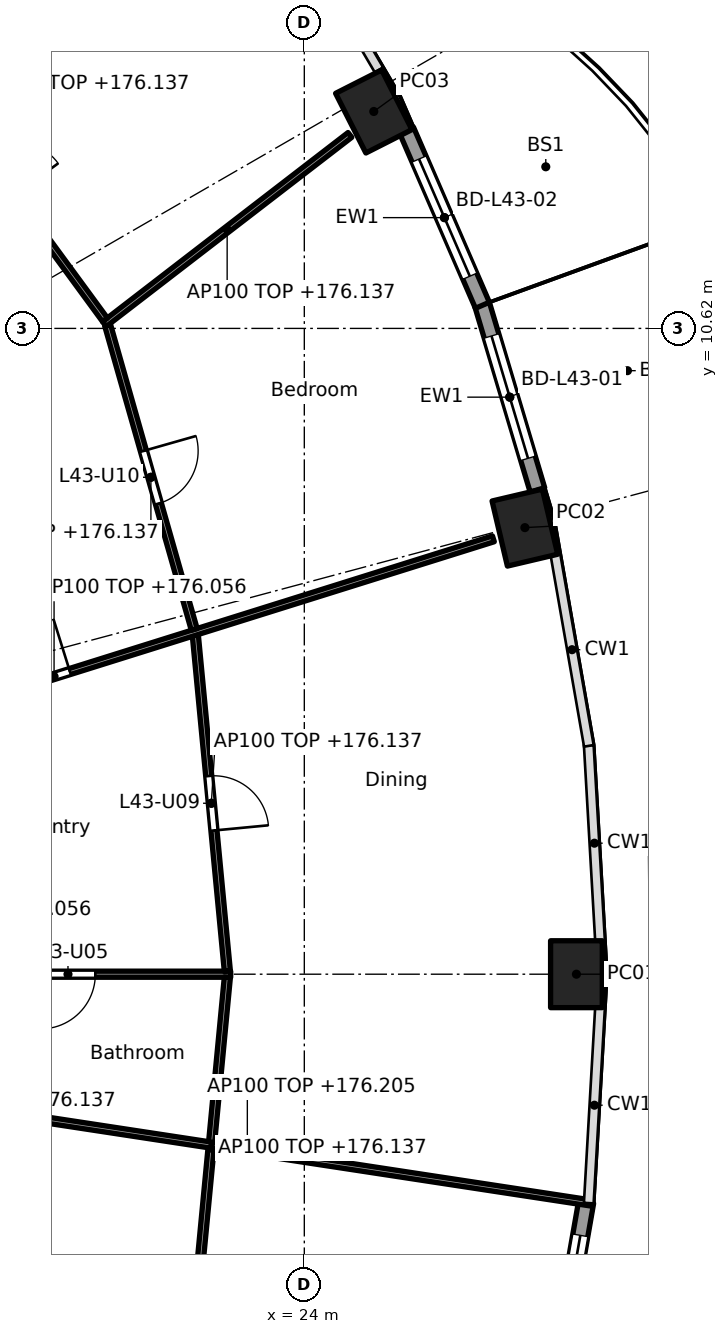
"""IFC4 building model, lengths in metres.
Left out: names, types, materials, properties, quantities, classifications, styles, units other than length and angle.
Written with IfcOpenShell. Run it as: python <this file> out.ifc"""

import sys

from ifc_helpers import new_model, si_unit, direction, frame, frame_2d, origin, origin_2d, place, context, subcontext, project, spatial, rectangle, hollow_rectangle, extrude, element, fill, save


model = new_model("IFC4")
c1 = context("Model", 3, precision=1e-05, world=origin(), true_north=direction((0.0, 1.0)))
c2 = subcontext(c1, "Body", "Model", "MODEL_VIEW")
j1 = project(units=[si_unit("LENGTHUNIT", "METRE"), si_unit("PLANEANGLEUNIT", "RADIAN")], contexts=[c1])
p1 = place(None, origin())
s1 = spatial("IfcSite", under=j1, at=p1, CompositionType="ELEMENT")
p2 = place(p1, origin())
s2 = spatial("IfcBuilding", under=s1, at=p2, CompositionType="ELEMENT")
p3 = place(p2, frame((0.0, 0.0, 173.3)))
s3 = spatial("IfcBuildingStorey", under=s2, at=p3, CompositionType="ELEMENT", Elevation=173.3)
for number, where, z_axis, x_axis in (
    (1, (28.475, 0.0, 0.0), (0.0, 0.0, 1.0), (0.0, 1.0, 0.0)),
    (2, (27.627, 7.344, 0.0), (0.0, 0.0, 1.0), (-0.229, 0.973, 0.0)),
    (3, (25.142, 14.188, 0.0), (0.0, 0.0, 1.0), (-0.452, 0.892, 0.0)),
):
    element("IfcColumn", number, at=place(p3, frame(where, z_axis=z_axis, x_axis=x_axis)), inside=s3, PredefinedType="COLUMN", context=c2, shape_type="SweptSolid", body=[
        extrude(hollow_rectangle(XDim=1.1, YDim=0.85, WallThickness=0.036, at=origin_2d()), origin(), (0.0, 0.0, 1.0), 3.7),
    ])
p4 = place(p3, frame((26.924, 11.014, 0.0), z_axis=(0.0, 0.0, 1.0), x_axis=(0.28584838049, -0.958274857946, 0.0)))
e4 = element("IfcWall", 4, at=p4, inside=s3, PredefinedType="SOLIDWALL", context=c2, shape_type="SweptSolid", body=[
    extrude(rectangle(XDim=3.182, YDim=0.25, at=frame_2d((1.591, 0.0))), origin(), (0.0, 0.0, 1.0), 3.44),
])
p5 = place(p4, frame((0.541, 0.0, 0.0)))
e5 = element("IfcOpeningElement", 5, at=p5, cuts=e4, PredefinedType="OPENING", context=c2, shape_type="SweptSolid", body=[
    extrude(rectangle(XDim=2.1, YDim=2.4, at=frame_2d((1.05, 1.2))), frame((0.0, 0.135, 0.0), z_axis=(0.0, -1.0, 0.0), x_axis=(1.0, 0.0, 0.0)), (0.0, 0.0, 1.0), 0.27),
])
p6 = place(p3, frame((25.679, 13.883, 0.0), z_axis=(0.0, 0.0, 1.0), x_axis=(0.397620521824, -0.917549955384, 0.0)))
e6 = element("IfcWall", 6, at=p6, inside=s3, PredefinedType="SOLIDWALL", context=c2, shape_type="SweptSolid", body=[
    extrude(rectangle(XDim=3.142, YDim=0.25, at=frame_2d((1.571, 0.0))), origin(), (0.0, 0.0, 1.0), 3.44),
])
p7 = place(p6, frame((0.521, 0.0, 0.0)))
e7 = element("IfcOpeningElement", 7, at=p7, cuts=e6, PredefinedType="OPENING", context=c2, shape_type="SweptSolid", body=[
    extrude(rectangle(XDim=2.1, YDim=2.4, at=frame_2d((1.05, 1.2))), frame((0.0, 0.135, 0.0), z_axis=(0.0, -1.0, 0.0), x_axis=(1.0, 0.0, 0.0)), (0.0, 0.0, 1.0), 0.27),
])
p8 = place(p3, frame((28.635, -3.747, 0.0), z_axis=(0.0, 0.0, 1.0), x_axis=(-0.172149769468, -0.985070787747, 0.0)))
e8 = element("IfcWall", 8, at=p8, inside=s3, PredefinedType="SOLIDWALL", context=c2, shape_type="SweptSolid", body=[
    extrude(rectangle(XDim=3.211, YDim=0.25, at=frame_2d((1.605, 0.0))), origin(), (0.0, 0.0, 1.0), 3.44),
])
p9 = place(p8, frame((0.555, 0.0, 0.0)))
e9 = element("IfcOpeningElement", 9, at=p9, cuts=e8, PredefinedType="OPENING", context=c2, shape_type="SweptSolid", body=[
    extrude(rectangle(XDim=2.1, YDim=2.4, at=frame_2d((1.05, 1.2))), frame((0.0, 0.135, 0.0), z_axis=(0.0, -1.0, 0.0), x_axis=(1.0, 0.0, 0.0)), (0.0, 0.0, 1.0), 0.27),
])
p10 = place(p3, frame((12.665, 0.0, 0.0), z_axis=(0.0, 0.0, 1.0), x_axis=(1.0, 0.0, 0.0)))
e10 = element("IfcWall", 10, at=p10, inside=s3, PredefinedType="PARTITIONING", context=c2, shape_type="SweptSolid", body=[
    extrude(rectangle(XDim=10.124, YDim=0.1, at=frame_2d((5.062, 0.0))), origin(), (0.0, 0.0, 1.0), 2.756),
])
p11 = place(p10, frame((1.961, 0.0, 0.0)))
e11 = element("IfcOpeningElement", 11, at=p11, cuts=e10, PredefinedType="OPENING", context=c2, shape_type="SweptSolid", body=[
    extrude(rectangle(XDim=0.9, YDim=2.1, at=frame_2d((0.45, 1.05))), frame((0.0, 0.06, 0.0), z_axis=(0.0, -1.0, 0.0), x_axis=(1.0, 0.0, 0.0)), (0.0, 0.0, 1.0), 0.12),
])
p12 = place(p10, frame((6.999, 0.0, 0.0)))
e12 = element("IfcOpeningElement", 12, at=p12, cuts=e10, PredefinedType="OPENING", context=c2, shape_type="SweptSolid", body=[
    extrude(rectangle(XDim=0.9, YDim=2.1, at=frame_2d((0.45, 1.05))), frame((0.0, 0.06, 0.0), z_axis=(0.0, -1.0, 0.0), x_axis=(1.0, 0.0, 0.0)), (0.0, 0.0, 1.0), 0.12),
])
p13 = place(p3, frame((22.734, 0.05, 0.0), z_axis=(0.0, 0.0, 1.0), x_axis=(-0.094923312677, 0.995484587882, 0.0)))
e13 = element("IfcWall", 13, at=p13, inside=s3, PredefinedType="PARTITIONING", context=c2, shape_type="SweptSolid", body=[
    extrude(rectangle(XDim=5.548, YDim=0.1, at=frame_2d((2.774, 0.0))), origin(), (0.0, 0.0, 1.0), 2.837),
])
p14 = place(p13, frame((2.324, 0.0, 0.0)))
e14 = element("IfcOpeningElement", 14, at=p14, cuts=e13, PredefinedType="OPENING", context=c2, shape_type="SweptSolid", body=[
    extrude(rectangle(XDim=0.9, YDim=2.1, at=frame_2d((0.45, 1.05))), frame((0.0, 0.06, 0.0), z_axis=(0.0, -1.0, 0.0), x_axis=(1.0, 0.0, 0.0)), (0.0, 0.0, 1.0), 0.12),
])
p15 = place(p3, frame((22.734, -0.05, 0.0), z_axis=(0.0, 0.0, 1.0), x_axis=(-0.0949274088, -0.995484197292, 0.0)))
e15 = element("IfcWall", 15, at=p15, inside=s3, PredefinedType="PARTITIONING", context=c2, shape_type="SweptSolid", body=[
    extrude(rectangle(XDim=5.648, YDim=0.1, at=frame_2d((2.824, 0.0))), origin(), (0.0, 0.0, 1.0), 2.837),
])
p16 = place(p3, frame((12.66, 2.632, 0.0), z_axis=(0.0, 0.0, 1.0), x_axis=(0.954248738607, 0.299013954302, 0.0)))
e16 = element("IfcWall", 16, at=p16, inside=s3, PredefinedType="PARTITIONING", context=c2, shape_type="SweptSolid", body=[
    extrude(rectangle(XDim=15.142, YDim=0.1, at=frame_2d((7.571, 0.0))), origin(), (0.0, 0.0, 1.0), 2.756),
])
p17 = place(p16, frame((0.669, 0.0, 0.0)))
e17 = element("IfcOpeningElement", 17, at=p17, cuts=e16, PredefinedType="OPENING", context=c2, shape_type="SweptSolid", body=[
    extrude(rectangle(XDim=0.9, YDim=2.1, at=frame_2d((0.45, 1.05))), frame((0.0, 0.06, 0.0), z_axis=(0.0, -1.0, 0.0), x_axis=(1.0, 0.0, 0.0)), (0.0, 0.0, 1.0), 0.12),
])
p18 = place(p16, frame((6.944, 0.0, 0.0)))
e18 = element("IfcOpeningElement", 18, at=p18, cuts=e16, PredefinedType="OPENING", context=c2, shape_type="SweptSolid", body=[
    extrude(rectangle(XDim=0.9, YDim=2.1, at=frame_2d((0.45, 1.05))), frame((0.0, 0.06, 0.0), z_axis=(0.0, -1.0, 0.0), x_axis=(1.0, 0.0, 0.0)), (0.0, 0.0, 1.0), 0.12),
])
p19 = place(p3, frame((22.189, 5.67, 0.0), z_axis=(0.0, 0.0, 1.0), x_axis=(-0.273815967041, 0.961782104322, 0.0)))
e19 = element("IfcWall", 19, at=p19, inside=s3, PredefinedType="PARTITIONING", context=c2, shape_type="SweptSolid", body=[
    extrude(rectangle(XDim=5.202, YDim=0.1, at=frame_2d((2.601, 0.0))), origin(), (0.0, 0.0, 1.0), 2.837),
])
p20 = place(p19, frame((2.151, 0.0, 0.0)))
e20 = element("IfcOpeningElement", 20, at=p20, cuts=e19, PredefinedType="OPENING", context=c2, shape_type="SweptSolid", body=[
    extrude(rectangle(XDim=0.9, YDim=2.1, at=frame_2d((0.45, 1.05))), frame((0.0, 0.06, 0.0), z_axis=(0.0, -1.0, 0.0), x_axis=(1.0, 0.0, 0.0)), (0.0, 0.0, 1.0), 0.12),
])
p21 = place(p3, frame((20.712, 10.691, 0.0), z_axis=(0.0, 0.0, 1.0), x_axis=(0.79220362146, 0.610256849323, 0.0)))
e21 = element("IfcWall", 21, at=p21, inside=s3, PredefinedType="PARTITIONING", context=c2, shape_type="SweptSolid", body=[
    extrude(rectangle(XDim=5.098, YDim=0.1, at=frame_2d((2.549, 0.0))), origin(), (0.0, 0.0, 1.0), 2.837),
])
p22 = place(p3, frame((20.722, 10.762, 0.0), z_axis=(0.0, 0.0, 1.0), x_axis=(-0.591124135033, 0.806580595466, 0.0)))
e22 = element("IfcWall", 22, at=p22, inside=s3, PredefinedType="PARTITIONING", context=c2, shape_type="SweptSolid", body=[
    extrude(rectangle(XDim=6.01, YDim=0.1, at=frame_2d((3.005, 0.0))), origin(), (0.0, 0.0, 1.0), 2.837),
])
p23 = place(p22, frame((2.53, 0.0, 0.0)))
e23 = element("IfcOpeningElement", 23, at=p23, cuts=e22, PredefinedType="OPENING", context=c2, shape_type="SweptSolid", body=[
    extrude(rectangle(XDim=0.9, YDim=2.1, at=frame_2d((0.45, 1.05))), frame((0.0, 0.06, 0.0), z_axis=(0.0, -1.0, 0.0), x_axis=(1.0, 0.0, 0.0)), (0.0, 0.0, 1.0), 0.12),
])
p24 = place(p3, frame((17.407, -2.039, 0.0), z_axis=(0.0, 0.0, 1.0), x_axis=(0.98858728603, -0.150649188184, 0.0)))
e24 = element("IfcWall", 24, at=p24, inside=s3, PredefinedType="PARTITIONING", context=c2, shape_type="SweptSolid", body=[
    extrude(rectangle(XDim=11.441, YDim=0.1, at=frame_2d((5.721, 0.0))), origin(), (0.0, 0.0, 1.0), 2.905),
])
p25 = place(p5, origin())
e25 = element("IfcDoor", 25, at=p25, inside=s3, OperationType="SLIDING_TO_LEFT", PredefinedType="DOOR", context=c2, shape_type="SweptSolid", body=[
    extrude(rectangle(XDim=2.1, YDim=2.4, at=frame_2d((1.05, 1.2))), frame((0.0, 0.025, 0.0), z_axis=(0.0, -1.0, 0.0), x_axis=(1.0, 0.0, 0.0)), (0.0, 0.0, 1.0), 0.05),
])
fill(e5, e25)
p26 = place(p7, origin())
e26 = element("IfcDoor", 26, at=p26, inside=s3, OperationType="SLIDING_TO_LEFT", PredefinedType="DOOR", context=c2, shape_type="SweptSolid", body=[
    extrude(rectangle(XDim=2.1, YDim=2.4, at=frame_2d((1.05, 1.2))), frame((0.0, 0.025, 0.0), z_axis=(0.0, -1.0, 0.0), x_axis=(1.0, 0.0, 0.0)), (0.0, 0.0, 1.0), 0.05),
])
fill(e7, e26)
p27 = place(p9, origin())
e27 = element("IfcDoor", 27, at=p27, inside=s3, OperationType="SLIDING_TO_LEFT", PredefinedType="DOOR", context=c2, shape_type="SweptSolid", body=[
    extrude(rectangle(XDim=2.1, YDim=2.4, at=frame_2d((1.05, 1.2))), frame((0.0, 0.025, 0.0), z_axis=(0.0, -1.0, 0.0), x_axis=(1.0, 0.0, 0.0)), (0.0, 0.0, 1.0), 0.05),
])
fill(e9, e27)
p28 = place(p12, frame((0.9, 0.0, 0.0), x_axis=(-1.0, 0.0, 0.0)))
e28 = element("IfcDoor", 28, at=p28, inside=s3, OperationType="SINGLE_SWING_RIGHT", PredefinedType="DOOR", context=c2, shape_type="SweptSolid", body=[
    extrude(rectangle(XDim=0.9, YDim=2.1, at=frame_2d((0.45, 1.05))), frame((0.0, 0.025, 0.0), z_axis=(0.0, -1.0, 0.0), x_axis=(1.0, 0.0, 0.0)), (0.0, 0.0, 1.0), 0.05),
])
fill(e12, e28)
p29 = place(p18, origin())
e29 = element("IfcDoor", 29, at=p29, inside=s3, OperationType="SINGLE_SWING_RIGHT", PredefinedType="DOOR", context=c2, shape_type="SweptSolid", body=[
    extrude(rectangle(XDim=0.9, YDim=2.1, at=frame_2d((0.45, 1.05))), frame((0.0, 0.025, 0.0), z_axis=(0.0, -1.0, 0.0), x_axis=(1.0, 0.0, 0.0)), (0.0, 0.0, 1.0), 0.05),
])
fill(e18, e29)
p30 = place(p14, frame((0.9, 0.0, 0.0), x_axis=(-1.0, 0.0, 0.0)))
e30 = element("IfcDoor", 30, at=p30, inside=s3, OperationType="SINGLE_SWING_RIGHT", PredefinedType="DOOR", context=c2, shape_type="SweptSolid", body=[
    extrude(rectangle(XDim=0.9, YDim=2.1, at=frame_2d((0.45, 1.05))), frame((0.0, 0.025, 0.0), z_axis=(0.0, -1.0, 0.0), x_axis=(1.0, 0.0, 0.0)), (0.0, 0.0, 1.0), 0.05),
])
fill(e14, e30)
p31 = place(p20, frame((0.9, 0.0, 0.0), x_axis=(-1.0, 0.0, 0.0)))
e31 = element("IfcDoor", 31, at=p31, inside=s3, OperationType="SINGLE_SWING_LEFT", PredefinedType="DOOR", context=c2, shape_type="SweptSolid", body=[
    extrude(rectangle(XDim=0.9, YDim=2.1, at=frame_2d((0.45, 1.05))), frame((0.0, 0.025, 0.0), z_axis=(0.0, -1.0, 0.0), x_axis=(1.0, 0.0, 0.0)), (0.0, 0.0, 1.0), 0.05),
])
fill(e20, e31)
save(model, sys.argv[1])
